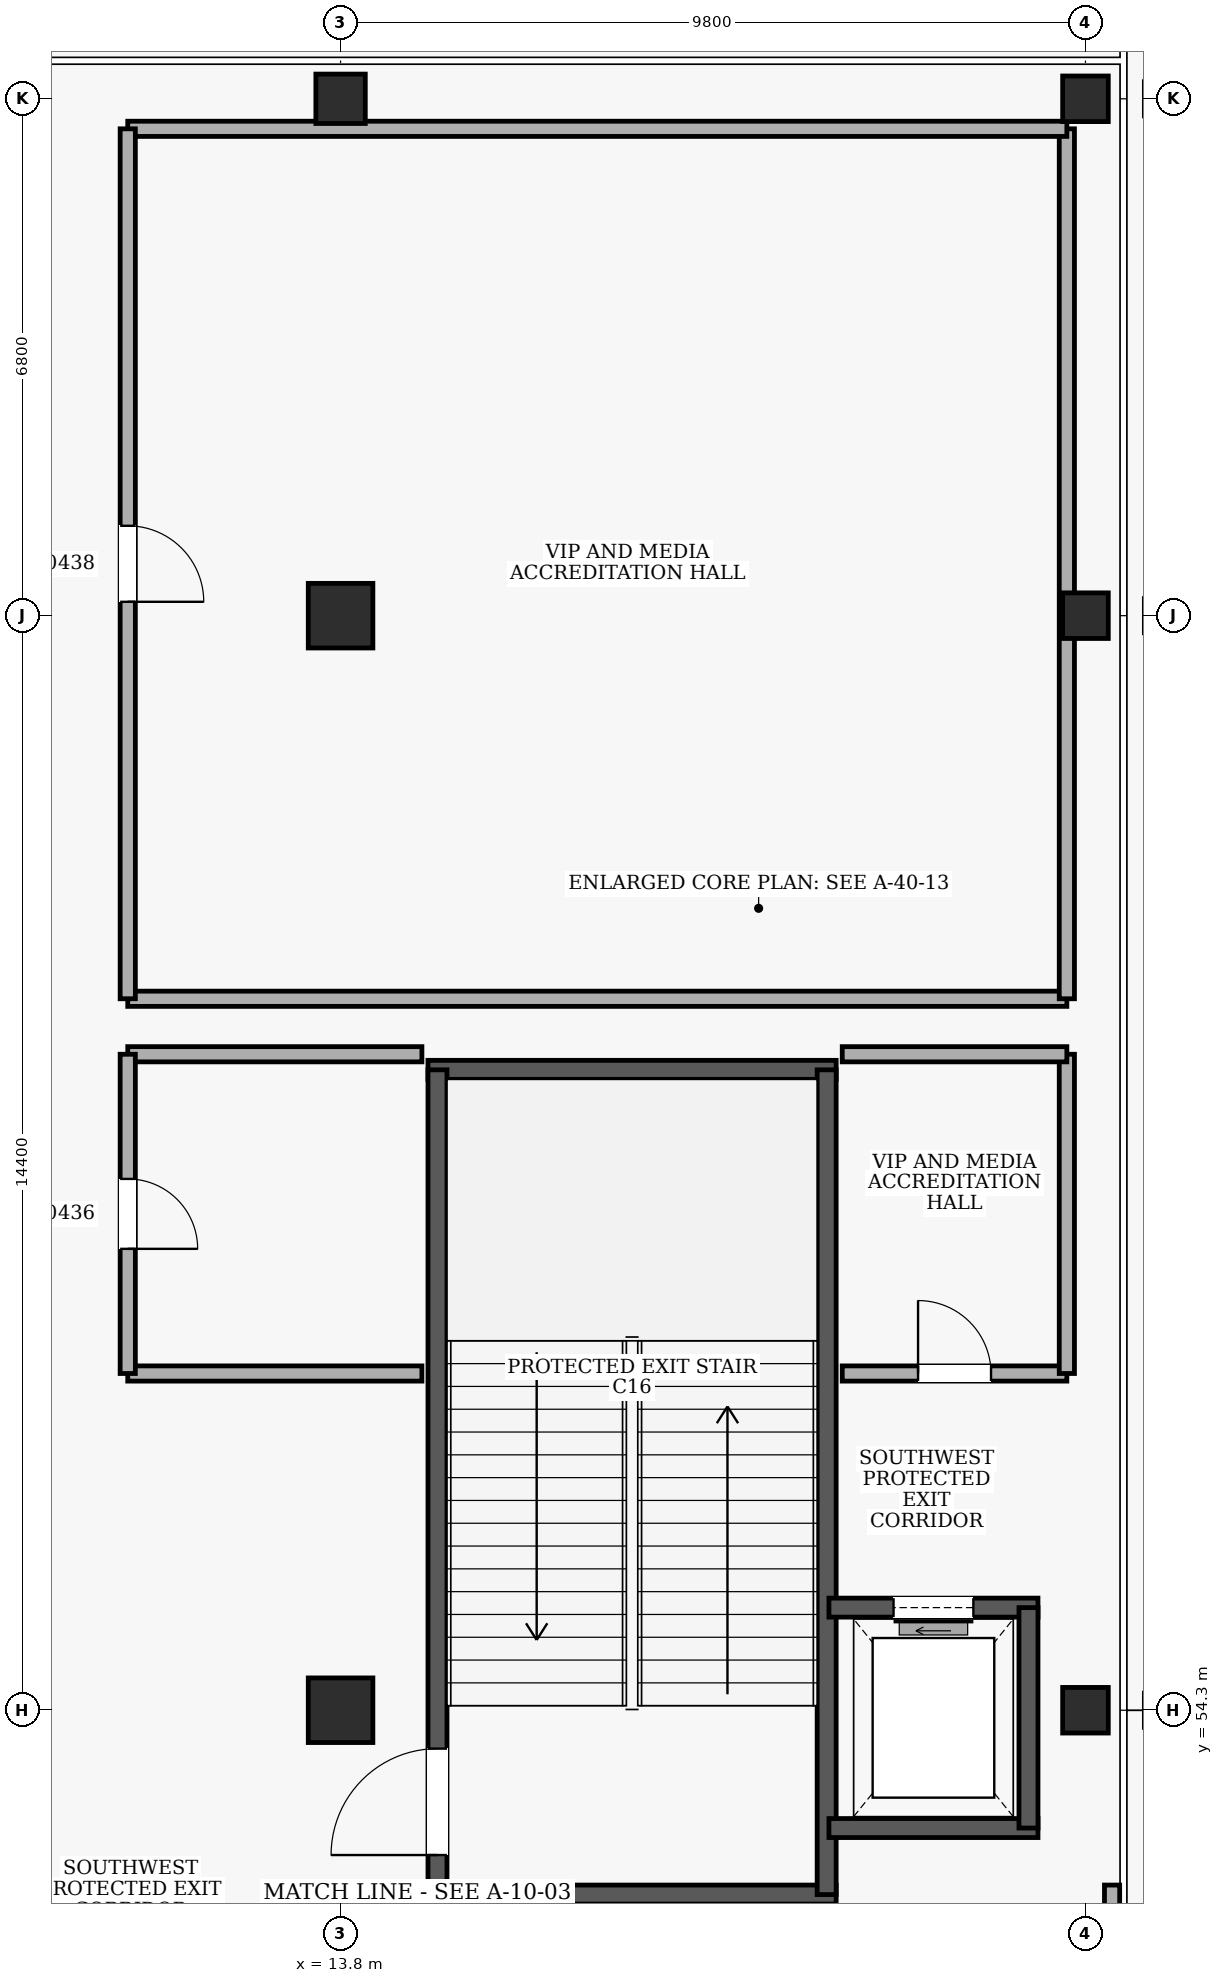
"""IFC4 building model, lengths in metres.
Left out: names, types, materials, properties, quantities, classifications, styles, units other than length and angle.
Written with IfcOpenShell. Run it as: python <this file> out.ifc"""

import sys

from ifc_helpers import new_model, si_unit, direction, frame, frame_2d, origin, origin_2d, place, context, subcontext, project, spatial, rectangle, extrude, element, fill, save


model = new_model("IFC4")
c1 = context("Model", 3, precision=1e-05, world=origin(), true_north=direction((0.0, 1.0)))
c2 = subcontext(c1, "Body", "Model", "MODEL_VIEW")
j1 = project(units=[si_unit("LENGTHUNIT", "METRE"), si_unit("PLANEANGLEUNIT", "RADIAN")], contexts=[c1])
p1 = place(None, origin())
s1 = spatial("IfcSite", under=j1, at=p1, CompositionType="ELEMENT")
p2 = place(p1, origin())
s2 = spatial("IfcBuilding", under=s1, at=p2, CompositionType="ELEMENT")
p3 = place(p2, origin())
s3 = spatial("IfcBuildingStorey", under=s2, at=p3, CompositionType="ELEMENT", Elevation=0.0)
for number, where, z_axis, x_axis in (
    (1, (13.8, 54.3, 0.0), (0.0, 0.0, 1.0), (1.0, 0.0, 0.0)),
    (2, (13.8, 68.7, 0.0), (0.0, 0.0, 1.0), (1.0, 0.0, 0.0)),
):
    element("IfcColumn", number, at=place(p3, frame(where, z_axis=z_axis, x_axis=x_axis)), inside=s3, PredefinedType="COLUMN", context=c2, shape_type="SweptSolid", body=[
        extrude(rectangle(XDim=0.85, YDim=0.85, at=origin_2d()), origin(), (0.0, 0.0, 1.0), 5.4),
    ])
p4 = place(p3, frame((13.8, 75.5, 0.0), z_axis=(0.0, 0.0, 1.0), x_axis=(1.0, 0.0, 0.0)))
e3 = element("IfcColumn", 3, at=p4, inside=s3, PredefinedType="COLUMN", context=c2, shape_type="SweptSolid", body=[
    extrude(rectangle(XDim=0.65, YDim=0.65, at=origin_2d()), origin(), (0.0, 0.0, 1.0), 5.4),
])
for number, where, z_axis, x_axis in (
    (4, (23.6, 54.3, 0.0), (0.0, 0.0, 1.0), (1.0, 0.0, 0.0)),
    (5, (23.6, 68.7, 0.0), (0.0, 0.0, 1.0), (1.0, 0.0, 0.0)),
    (6, (23.6, 75.5, 0.0), (0.0, 0.0, 1.0), (1.0, 0.0, 0.0)),
):
    element("IfcColumn", number, at=place(p3, frame(where, z_axis=z_axis, x_axis=x_axis)), inside=s3, PredefinedType="COLUMN", context=c2, shape_type="SweptSolid", body=[
        extrude(rectangle(XDim=0.6, YDim=0.6, at=origin_2d()), origin(), (0.0, 0.0, 1.0), 5.4),
    ])
for number, where, z_axis, x_axis in (
    (7, (14.95, 51.875, 0.0), (0.0, 0.0, 1.0), (1.0, 0.0, 0.0)),
    (8, (20.32, 62.725, 0.0), (0.0, 0.0, 1.0), (-1.0, 0.0, 0.0)),
):
    element("IfcWall", number, at=place(p3, frame(where, z_axis=z_axis, x_axis=x_axis)), inside=s3, PredefinedType="SHEAR", context=c2, shape_type="SweptSolid", body=[
        extrude(rectangle(XDim=5.37, YDim=0.25, at=frame_2d((2.685, 0.0))), origin(), (0.0, 0.0, 1.0), 5.08),
    ])
p5 = place(p3, frame((15.075, 51.875, 0.0), z_axis=(0.0, 0.0, 1.0), x_axis=(0.0, 1.0, 0.0)))
e9 = element("IfcWall", 9, at=p5, inside=s3, PredefinedType="SHEAR", context=c2, shape_type="SweptSolid", body=[
    extrude(rectangle(XDim=10.85, YDim=0.25, at=frame_2d((5.425, 0.0))), origin(), (0.0, 0.0, 1.0), 5.08),
])
p6 = place(p5, frame((0.52, 0.0, 0.0)))
e10 = element("IfcOpeningElement", 10, at=p6, cuts=e9, PredefinedType="OPENING", context=c2, shape_type="SweptSolid", body=[
    extrude(rectangle(XDim=1.4, YDim=2.15, at=frame_2d((0.7, 1.075))), frame((0.0, 0.135, 0.0), z_axis=(0.0, -1.0, 0.0), x_axis=(1.0, 0.0, 0.0)), (0.0, 0.0, 1.0), 0.27),
])
p7 = place(p3, frame((20.195, 51.875, 0.0), z_axis=(0.0, 0.0, 1.0), x_axis=(0.0, 1.0, 0.0)))
e11 = element("IfcWall", 11, at=p7, inside=s3, PredefinedType="SHEAR", context=c2, shape_type="SweptSolid", body=[
    extrude(rectangle(XDim=10.85, YDim=0.25, at=frame_2d((5.425, 0.0))), origin(), (0.0, 0.0, 1.0), 5.08),
])
p8 = place(p3, frame((20.225, 52.75, 0.0), z_axis=(0.0, 0.0, 1.0), x_axis=(1.0, 0.0, 0.0)))
e12 = element("IfcWall", 12, at=p8, inside=s3, PredefinedType="SHEAR", context=c2, shape_type="SweptSolid", body=[
    extrude(rectangle(XDim=2.75, YDim=0.25, at=frame_2d((1.375, 0.0))), origin(), (0.0, 0.0, 1.0), 5.08),
])
p9 = place(p3, frame((22.975, 55.65, 0.0), z_axis=(0.0, 0.0, 1.0), x_axis=(-1.0, 0.0, 0.0)))
e13 = element("IfcWall", 13, at=p9, inside=s3, PredefinedType="SHEAR", context=c2, shape_type="SweptSolid", body=[
    extrude(rectangle(XDim=2.75, YDim=0.25, at=frame_2d((1.375, 0.0))), origin(), (0.0, 0.0, 1.0), 5.08),
])
p10 = place(p9, frame((0.85, 0.0, 0.0)))
e14 = element("IfcOpeningElement", 14, at=p10, cuts=e13, PredefinedType="OPENING", context=c2, shape_type="SweptSolid", body=[
    extrude(rectangle(XDim=1.05, YDim=2.15, at=frame_2d((0.525, 1.075))), frame((0.0, 0.135, 0.0), z_axis=(0.0, -1.0, 0.0), x_axis=(1.0, 0.0, 0.0)), (0.0, 0.0, 1.0), 0.27),
])
p11 = place(p3, frame((22.85, 52.75, 0.0), z_axis=(0.0, 0.0, 1.0), x_axis=(0.0, 1.0, 0.0)))
e15 = element("IfcWall", 15, at=p11, inside=s3, PredefinedType="SHEAR", context=c2, shape_type="SweptSolid", body=[
    extrude(rectangle(XDim=2.9, YDim=0.25, at=frame_2d((1.45, 0.0))), origin(), (0.0, 0.0, 1.0), 5.08),
])
p12 = place(p3, frame((23.95, 49.4, 0.0), z_axis=(0.0, 0.0, 1.0), x_axis=(0.0, 1.0, 0.0)))
e16 = element("IfcWall", 16, at=p12, inside=s3, PredefinedType="PARTITIONING", context=c2, shape_type="SweptSolid", body=[
    extrude(rectangle(XDim=2.6, YDim=0.2, at=frame_2d((1.3, 0.0))), origin(), (0.0, 0.0, 1.0), 4.41),
])
p13 = place(p12, frame((0.6, 0.0, 0.0)))
e17 = element("IfcOpeningElement", 17, at=p13, cuts=e16, PredefinedType="OPENING", context=c2, shape_type="SweptSolid", body=[
    extrude(rectangle(XDim=1.4, YDim=2.15, at=frame_2d((0.7, 1.075))), frame((0.0, 0.11, 0.0), z_axis=(0.0, -1.0, 0.0), x_axis=(1.0, 0.0, 0.0)), (0.0, 0.0, 1.0), 0.22),
])
for number, where, z_axis, x_axis in (
    (18, (11.0, 58.73, 0.0), (0.0, 0.0, 1.0), (1.0, 0.0, 0.0)),
    (19, (14.87, 62.93, 0.0), (0.0, 0.0, 1.0), (-1.0, 0.0, 0.0)),
):
    element("IfcWall", number, at=place(p3, frame(where, z_axis=z_axis, x_axis=x_axis)), inside=s3, PredefinedType="PARTITIONING", context=c2, shape_type="SweptSolid", body=[
        extrude(rectangle(XDim=3.87, YDim=0.2, at=frame_2d((1.935, 0.0))), origin(), (0.0, 0.0, 1.0), 5.08),
    ])
p14 = place(p3, frame((11.0, 62.93, 0.0), z_axis=(0.0, 0.0, 1.0), x_axis=(0.0, -1.0, 0.0)))
e20 = element("IfcWall", 20, at=p14, inside=s3, PredefinedType="PARTITIONING", context=c2, shape_type="SweptSolid", body=[
    extrude(rectangle(XDim=4.2, YDim=0.2, at=frame_2d((2.1, 0.0))), origin(), (0.0, 0.0, 1.0), 5.08),
])
p15 = place(p14, frame((1.64, 0.0, 0.0)))
e21 = element("IfcOpeningElement", 21, at=p15, cuts=e20, PredefinedType="OPENING", context=c2, shape_type="SweptSolid", body=[
    extrude(rectangle(XDim=0.92, YDim=2.1, at=frame_2d((0.46, 1.05))), frame((0.0, 0.11, 0.0), z_axis=(0.0, -1.0, 0.0), x_axis=(1.0, 0.0, 0.0)), (0.0, 0.0, 1.0), 0.22),
])
p16 = place(p3, frame((20.4, 58.73, 0.0), z_axis=(0.0, 0.0, 1.0), x_axis=(1.0, 0.0, 0.0)))
e22 = element("IfcWall", 22, at=p16, inside=s3, PredefinedType="PARTITIONING", context=c2, shape_type="SweptSolid", body=[
    extrude(rectangle(XDim=2.955, YDim=0.2, at=frame_2d((1.478, 0.0))), origin(), (0.0, 0.0, 1.0), 5.08),
])
p17 = place(p16, frame((0.998, 0.0, 0.0)))
e23 = element("IfcOpeningElement", 23, at=p17, cuts=e22, PredefinedType="OPENING", context=c2, shape_type="SweptSolid", body=[
    extrude(rectangle(XDim=0.96, YDim=2.1, at=frame_2d((0.48, 1.05))), frame((0.0, 0.11, 0.0), z_axis=(0.0, -1.0, 0.0), x_axis=(1.0, 0.0, 0.0)), (0.0, 0.0, 1.0), 0.22),
])
p18 = place(p3, frame((23.355, 58.73, 0.0), z_axis=(0.0, 0.0, 1.0), x_axis=(0.0, 1.0, 0.0)))
e24 = element("IfcWall", 24, at=p18, inside=s3, PredefinedType="PARTITIONING", context=c2, shape_type="SweptSolid", body=[
    extrude(rectangle(XDim=4.2, YDim=0.2, at=frame_2d((2.1, 0.0))), origin(), (0.0, 0.0, 1.0), 4.61),
])
p19 = place(p3, frame((23.355, 62.93, 0.0), z_axis=(0.0, 0.0, 1.0), x_axis=(-1.0, 0.0, 0.0)))
e25 = element("IfcWall", 25, at=p19, inside=s3, PredefinedType="PARTITIONING", context=c2, shape_type="SweptSolid", body=[
    extrude(rectangle(XDim=2.955, YDim=0.2, at=frame_2d((1.478, 0.0))), origin(), (0.0, 0.0, 1.0), 5.08),
])
p20 = place(p3, frame((11.0, 63.66, 0.0), z_axis=(0.0, 0.0, 1.0), x_axis=(1.0, 0.0, 0.0)))
e26 = element("IfcWall", 26, at=p20, inside=s3, PredefinedType="PARTITIONING", context=c2, shape_type="SweptSolid", body=[
    extrude(rectangle(XDim=12.355, YDim=0.2, at=frame_2d((6.177, 0.0))), origin(), (0.0, 0.0, 1.0), 5.08),
])
p21 = place(p3, frame((23.355, 63.66, 0.0), z_axis=(0.0, 0.0, 1.0), x_axis=(0.0, 1.0, 0.0)))
e27 = element("IfcWall", 27, at=p21, inside=s3, PredefinedType="PARTITIONING", context=c2, shape_type="SweptSolid", body=[
    extrude(rectangle(XDim=11.445, YDim=0.2, at=frame_2d((5.723, 0.0))), origin(), (0.0, 0.0, 1.0), 4.41),
])
p22 = place(p3, frame((23.355, 75.105, 0.0), z_axis=(0.0, 0.0, 1.0), x_axis=(-1.0, 0.0, 0.0)))
e28 = element("IfcWall", 28, at=p22, inside=s3, PredefinedType="PARTITIONING", context=c2, shape_type="SweptSolid", body=[
    extrude(rectangle(XDim=12.355, YDim=0.2, at=frame_2d((6.177, 0.0))), origin(), (0.0, 0.0, 1.0), 4.21),
])
p23 = place(p3, frame((11.0, 75.105, 0.0), z_axis=(0.0, 0.0, 1.0), x_axis=(0.0, -1.0, 0.0)))
e29 = element("IfcWall", 29, at=p23, inside=s3, PredefinedType="PARTITIONING", context=c2, shape_type="SweptSolid", body=[
    extrude(rectangle(XDim=11.445, YDim=0.2, at=frame_2d((5.723, 0.0))), origin(), (0.0, 0.0, 1.0), 5.08),
])
p24 = place(p23, frame((5.222, 0.0, 0.0)))
e30 = element("IfcOpeningElement", 30, at=p24, cuts=e29, PredefinedType="OPENING", context=c2, shape_type="SweptSolid", body=[
    extrude(rectangle(XDim=1.0, YDim=2.1, at=frame_2d((0.5, 1.05))), frame((0.0, 0.11, 0.0), z_axis=(0.0, -1.0, 0.0), x_axis=(1.0, 0.0, 0.0)), (0.0, 0.0, 1.0), 0.22),
])
p25 = place(p6, origin())
e31 = element("IfcDoor", 31, at=p25, inside=s3, OperationType="SINGLE_SWING_LEFT", PredefinedType="DOOR", context=c2, shape_type="SweptSolid", body=[
    extrude(rectangle(XDim=1.4, YDim=2.15, at=frame_2d((0.7, 1.075))), frame((0.0, 0.025, 0.0), z_axis=(0.0, -1.0, 0.0), x_axis=(1.0, 0.0, 0.0)), (0.0, 0.0, 1.0), 0.05),
])
fill(e10, e31)
p26 = place(p10, origin())
e32 = element("IfcDoor", 32, at=p26, inside=s3, OperationType="SLIDING_TO_LEFT", PredefinedType="DOOR", context=c2, shape_type="SweptSolid", body=[
    extrude(rectangle(XDim=1.05, YDim=2.15, at=frame_2d((0.525, 1.075))), frame((0.0, 0.025, 0.0), z_axis=(0.0, -1.0, 0.0), x_axis=(1.0, 0.0, 0.0)), (0.0, 0.0, 1.0), 0.05),
])
fill(e14, e32)
p27 = place(p15, origin())
e33 = element("IfcDoor", 33, at=p27, inside=s3, OperationType="SINGLE_SWING_RIGHT", PredefinedType="DOOR", context=c2, shape_type="SweptSolid", body=[
    extrude(rectangle(XDim=0.92, YDim=2.1, at=frame_2d((0.46, 1.05))), frame((0.0, 0.025, 0.0), z_axis=(0.0, -1.0, 0.0), x_axis=(1.0, 0.0, 0.0)), (0.0, 0.0, 1.0), 0.05),
])
fill(e21, e33)
p28 = place(p17, origin())
e34 = element("IfcDoor", 34, at=p28, inside=s3, OperationType="SINGLE_SWING_LEFT", PredefinedType="DOOR", context=c2, shape_type="SweptSolid", body=[
    extrude(rectangle(XDim=0.96, YDim=2.1, at=frame_2d((0.48, 1.05))), frame((0.0, 0.025, 0.0), z_axis=(0.0, -1.0, 0.0), x_axis=(1.0, 0.0, 0.0)), (0.0, 0.0, 1.0), 0.05),
])
fill(e23, e34)
p29 = place(p24, origin())
e35 = element("IfcDoor", 35, at=p29, inside=s3, OperationType="SINGLE_SWING_RIGHT", PredefinedType="DOOR", context=c2, shape_type="SweptSolid", body=[
    extrude(rectangle(XDim=1.0, YDim=2.1, at=frame_2d((0.5, 1.05))), frame((0.0, 0.025, 0.0), z_axis=(0.0, -1.0, 0.0), x_axis=(1.0, 0.0, 0.0)), (0.0, 0.0, 1.0), 0.05),
])
fill(e30, e35)
save(model, sys.argv[1])
